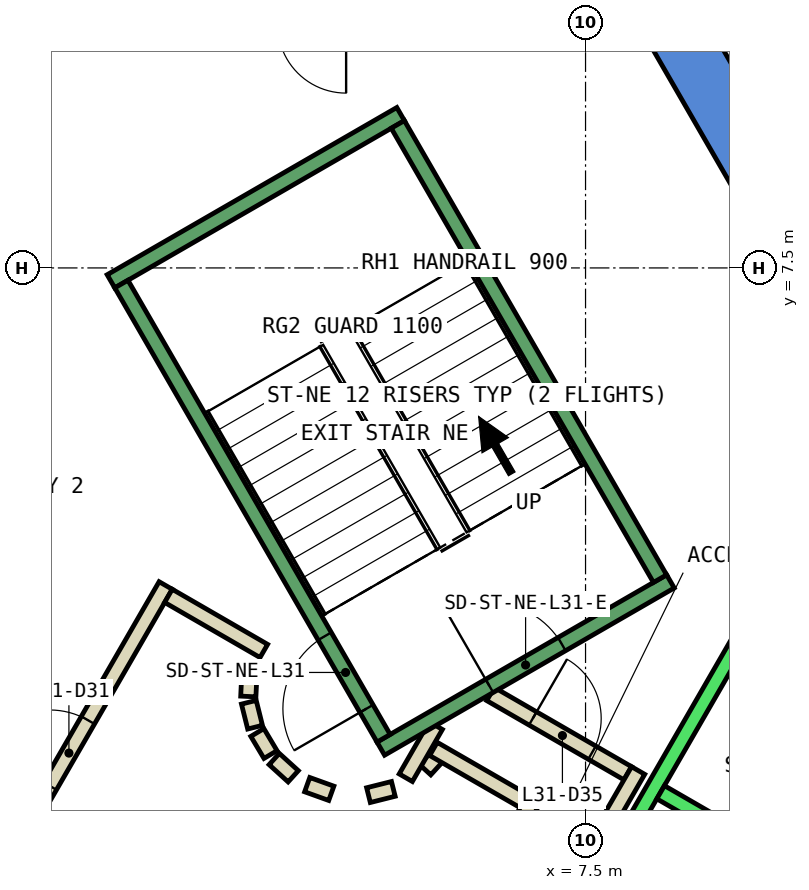
"""IFC4 building model, lengths in metres.
Left out: names, types, materials, properties, quantities, classifications, styles, units other than length and angle.
Written with IfcOpenShell. Run it as: python <this file> out.ifc"""

import sys

from ifc_helpers import new_model, si_unit, direction, frame, frame_2d, origin, place, context, subcontext, project, spatial, polyline, rectangle, outline, extrude, element, fill, save


model = new_model("IFC4")
c1 = context("Model", 3, precision=1e-05, world=origin(), true_north=direction((0.0, 1.0)))
c2 = subcontext(c1, "Body", "Model", "MODEL_VIEW")
j1 = project(units=[si_unit("LENGTHUNIT", "METRE"), si_unit("PLANEANGLEUNIT", "RADIAN")], contexts=[c1])
p1 = place(None, origin())
s1 = spatial("IfcSite", under=j1, at=p1, CompositionType="ELEMENT")
p2 = place(p1, origin())
s2 = spatial("IfcBuilding", under=s1, at=p2, CompositionType="ELEMENT")
p3 = place(p2, frame((0.0, 0.0, 142.4)))
s3 = spatial("IfcBuildingStorey", under=s2, at=p3, CompositionType="ELEMENT", Elevation=142.4)
p4 = place(p3, frame((0.0, 0.0, -0.4)))
e1 = element("IfcWall", 1, at=p4, inside=s3, PredefinedType="SHEAR", context=c2, shape_type="SweptSolid", body=[
    extrude(outline(polyline([(8.517, 11.748), (7.824, 11.348), (12.933, 2.5), (13.856, 2.5), (8.517, 11.748)])), origin(), (0.0, 0.0, 1.0), 4.2),
])
p5 = place(p3, frame((5.39, 0.898, 0.0), z_axis=(0.0, 0.0, 1.0), x_axis=(0.673828488714, 0.738887791073, 0.0)))
e2 = element("IfcWall", 2, at=p5, inside=s3, PredefinedType="PARTITIONING", context=c2, shape_type="SweptSolid", body=[
    extrude(rectangle(XDim=0.263, YDim=0.2, at=frame_2d((0.131, 0.0))), origin(), (0.0, 0.0, 1.0), 3.8),
])
p6 = place(p3, frame((5.499, 1.172, 0.0), z_axis=(0.0, 0.0, 1.0), x_axis=(0.866333505267, -0.499465972466, 0.0)))
e3 = element("IfcWall", 3, at=p6, inside=s3, PredefinedType="PARTITIONING", context=c2, shape_type="SweptSolid", body=[
    extrude(rectangle(XDim=1.374, YDim=0.2, at=frame_2d((0.687, 0.0))), origin(), (0.0, 0.0, 1.0), 3.8),
])
p7 = place(p3, frame((6.826, 0.522, 0.0), z_axis=(0.0, 0.0, 1.0), x_axis=(-0.500016722714, -0.866015748706, 0.0)))
e4 = element("IfcWall", 4, at=p7, inside=s3, PredefinedType="PARTITIONING", context=c2, shape_type="SweptSolid", body=[
    extrude(rectangle(XDim=1.7, YDim=0.2, at=frame_2d((0.85, 0.0))), origin(), (0.0, 0.0, 1.0), 3.8),
])
p8 = place(p3, frame((6.25, 1.894, 0.0), z_axis=(0.0, 0.0, 1.0), x_axis=(0.866043184279, -0.499969202016, 0.0)))
e5 = element("IfcWall", 5, at=p8, inside=s3, PredefinedType="PARTITIONING", context=c2, shape_type="SweptSolid", body=[
    extrude(rectangle(XDim=2.084, YDim=0.2, at=frame_2d((1.042, 0.0))), origin(), (0.0, 0.0, 1.0), 3.8),
])
p9 = place(p8, frame((0.642, 0.0, 0.0)))
e6 = element("IfcOpeningElement", 6, at=p9, cuts=e5, PredefinedType="OPENING", context=c2, shape_type="SweptSolid", body=[
    extrude(rectangle(XDim=0.9, YDim=2.1, at=frame_2d((0.45, 1.05))), frame((0.0, 0.11, 0.0), z_axis=(0.0, -1.0, 0.0), x_axis=(1.0, 0.0, 0.0)), (0.0, 0.0, 1.0), 0.22),
])
p10 = place(p3, frame((8.192, 0.888, 0.0), z_axis=(0.0, 0.0, 1.0), x_axis=(-0.499940625693, -0.866059680843, 0.0)))
e7 = element("IfcWall", 7, at=p10, inside=s3, PredefinedType="PARTITIONING", context=c2, shape_type="SweptSolid", body=[
    extrude(rectangle(XDim=2.68, YDim=0.2, at=frame_2d((1.34, 0.0))), origin(), (0.0, 0.0, 1.0), 3.8),
])
p11 = place(p3, frame((5.135, 0.793, 0.0), z_axis=(0.0, 0.0, 1.0), x_axis=(0.499526442893, 0.866298639529, 0.0)))
e8 = element("IfcWall", 8, at=p11, inside=s3, PredefinedType="PARTITIONING", context=c2, shape_type="SweptSolid", body=[
    extrude(rectangle(XDim=0.791, YDim=0.2, at=frame_2d((0.396, 0.0))), origin(), (0.0, 0.0, 1.0), 3.8),
])
p12 = place(p3, frame((-0.52, -1.0, 0.0), z_axis=(0.0, 0.0, 1.0), x_axis=(0.50011622646, 0.865958290007, 0.0)))
e9 = element("IfcWall", 9, at=p12, inside=s3, PredefinedType="PARTITIONING", context=c2, shape_type="SweptSolid", body=[
    extrude(rectangle(XDim=4.991, YDim=0.2, at=frame_2d((2.496, 0.0))), origin(), (0.0, 0.0, 1.0), 3.8),
])
p13 = place(p12, frame((1.945, 0.0, 0.0)))
e10 = element("IfcOpeningElement", 10, at=p13, cuts=e9, PredefinedType="OPENING", context=c2, shape_type="SweptSolid", body=[
    extrude(rectangle(XDim=1.0, YDim=2.1, at=frame_2d((0.5, 1.05))), frame((0.0, 0.11, 0.0), z_axis=(0.0, -1.0, 0.0), x_axis=(1.0, 0.0, 0.0)), (0.0, 0.0, 1.0), 0.22),
])
p14 = place(p3, frame((2.012, 3.186, 0.0), z_axis=(0.0, 0.0, 1.0), x_axis=(0.865891012941, -0.500232699559, 0.0)))
e11 = element("IfcWall", 11, at=p14, inside=s3, PredefinedType="PARTITIONING", context=c2, shape_type="SweptSolid", body=[
    extrude(rectangle(XDim=1.449, YDim=0.2, at=frame_2d((0.725, 0.0))), origin(), (0.0, 0.0, 1.0), 3.8),
])
p15 = place(p3, frame((3.079, 2.199, 0.0), z_axis=(0.0, 0.0, 1.0), x_axis=(-0.047771483479, -0.998858290933, 0.0)))
e12 = element("IfcWall", 12, at=p15, inside=s3, PredefinedType="PARTITIONING", context=c2, shape_type="SweptSolid", body=[
    extrude(rectangle(XDim=0.337, YDim=0.2, at=frame_2d((0.169, 0.0))), origin(), (0.0, 0.0, 1.0), 3.8),
])
p16 = place(p3, frame((3.07, 1.786, 0.0), z_axis=(0.0, 0.0, 1.0), x_axis=(0.242705583207, -0.970099994784, 0.0)))
e13 = element("IfcWall", 13, at=p16, inside=s3, PredefinedType="PARTITIONING", context=c2, shape_type="SweptSolid", body=[
    extrude(rectangle(XDim=0.338, YDim=0.2, at=frame_2d((0.169, 0.0))), origin(), (0.0, 0.0, 1.0), 3.8),
])
for number, where, z_axis, x_axis in (
    (14, (3.182, 1.388, 0.0), (0.0, 0.0, 1.0), (0.512, -0.859, 0.0)),
    (15, (3.404, 1.039, 0.0), (0.0, 0.0, 1.0), (0.74, -0.672, 0.0)),
):
    element("IfcWall", number, at=place(p3, frame(where, z_axis=z_axis, x_axis=x_axis)), inside=s3, PredefinedType="PARTITIONING", context=c2, shape_type="SweptSolid", body=[
        extrude(rectangle(XDim=0.338, YDim=0.2, at=frame_2d((0.169, 0.0))), origin(), (0.0, 0.0, 1.0), 3.8),
    ])
p17 = place(p3, frame((3.838, 0.702, 0.0), z_axis=(0.0, 0.0, 1.0), x_axis=(0.941035081519, -0.338308993895, 0.0)))
e16 = element("IfcWall", 16, at=p17, inside=s3, PredefinedType="PARTITIONING", context=c2, shape_type="SweptSolid", body=[
    extrude(rectangle(XDim=0.337, YDim=0.2, at=frame_2d((0.168, 0.0))), origin(), (0.0, 0.0, 1.0), 3.8),
])
p18 = place(p3, frame((4.644, 0.564, 0.0), z_axis=(0.0, 0.0, 1.0), x_axis=(0.969929076366, 0.243387729394, 0.0)))
e17 = element("IfcWall", 17, at=p18, inside=s3, PredefinedType="PARTITIONING", context=c2, shape_type="SweptSolid", body=[
    extrude(rectangle(XDim=0.337, YDim=0.2, at=frame_2d((0.168, 0.0))), origin(), (0.0, 0.0, 1.0), 3.8),
])
p19 = place(p3, frame((4.451, -6.19, 0.0), z_axis=(0.0, 0.0, 1.0), x_axis=(0.50000090737, 0.866024879913, 0.0)))
e18 = element("IfcWall", 18, at=p19, inside=s3, PredefinedType="STANDARD", context=c2, shape_type="SweptSolid", body=[
    extrude(rectangle(XDim=10.6, YDim=0.2, at=frame_2d((5.3, 0.0))), origin(), (0.0, 0.0, 1.0), 3.8),
])
p20 = place(p3, frame((8.488, 0.602, 0.0), z_axis=(0.0, 0.0, 1.0), x_axis=(0.866022959057, -0.500004234368, 0.0)))
e19 = element("IfcWall", 19, at=p20, inside=s3, PredefinedType="STANDARD", context=c2, shape_type="SweptSolid", body=[
    extrude(rectangle(XDim=2.5, YDim=0.2, at=frame_2d((1.25, 0.0))), origin(), (0.0, 0.0, 1.0), 3.8),
])
p21 = place(p3, frame((4.806, 1.176, 0.0), z_axis=(0.0, 0.0, 1.0), x_axis=(0.866059941101, 0.499940174841, 0.0)))
e20 = element("IfcWall", 20, at=p21, inside=s3, PredefinedType="STANDARD", context=c2, shape_type="SweptSolid", body=[
    extrude(rectangle(XDim=4.4, YDim=0.2, at=frame_2d((2.2, 0.0))), origin(), (0.0, 0.0, 1.0), 3.8),
])
p22 = place(p21, frame((1.65, 0.0, 0.0)))
e21 = element("IfcOpeningElement", 21, at=p22, cuts=e20, PredefinedType="OPENING", context=c2, shape_type="SweptSolid", body=[
    extrude(rectangle(XDim=1.1, YDim=2.2, at=frame_2d((0.55, 1.1))), frame((0.0, 0.11, 0.0), z_axis=(0.0, -1.0, 0.0), x_axis=(1.0, 0.0, 0.0)), (0.0, 0.0, 1.0), 0.22),
])
p23 = place(p3, frame((1.256, 7.324, 0.0), z_axis=(0.0, 0.0, 1.0), x_axis=(0.866046073146, 0.499964197906, 0.0)))
e22 = element("IfcWall", 22, at=p23, inside=s3, PredefinedType="STANDARD", context=c2, shape_type="SweptSolid", body=[
    extrude(rectangle(XDim=4.4, YDim=0.2, at=frame_2d((2.2, 0.0))), origin(), (0.0, 0.0, 1.0), 3.8),
])
p24 = place(p3, frame((4.843, 1.312, 0.0), z_axis=(0.0, 0.0, 1.0), x_axis=(-0.499963383562, 0.866046543262, 0.0)))
e23 = element("IfcWall", 23, at=p24, inside=s3, PredefinedType="STANDARD", context=c2, shape_type="SweptSolid", body=[
    extrude(rectangle(XDim=6.9, YDim=0.2, at=frame_2d((3.45, 0.0))), origin(), (0.0, 0.0, 1.0), 3.8),
])
p25 = place(p24, frame((0.45, 0.0, 0.0)))
e24 = element("IfcOpeningElement", 24, at=p25, cuts=e23, PredefinedType="OPENING", context=c2, shape_type="SweptSolid", body=[
    extrude(rectangle(XDim=1.1, YDim=2.2, at=frame_2d((0.55, 1.1))), frame((0.0, 0.11, 0.0), z_axis=(0.0, -1.0, 0.0), x_axis=(1.0, 0.0, 0.0)), (0.0, 0.0, 1.0), 0.22),
])
p26 = place(p3, frame((8.48, 3.412, 0.0), z_axis=(0.0, 0.0, 1.0), x_axis=(-0.499978703459, 0.866037698999, 0.0)))
e25 = element("IfcWall", 25, at=p26, inside=s3, PredefinedType="STANDARD", context=c2, shape_type="SweptSolid", body=[
    extrude(rectangle(XDim=6.9, YDim=0.2, at=frame_2d((3.45, 0.0))), origin(), (0.0, 0.0, 1.0), 3.8),
])
p27 = place(p13, origin())
e26 = element("IfcDoor", 26, at=p27, inside=s3, OperationType="SINGLE_SWING_LEFT", PredefinedType="DOOR", context=c2, shape_type="SweptSolid", body=[
    extrude(rectangle(XDim=1.0, YDim=2.1, at=frame_2d((0.5, 1.05))), frame((0.0, 0.025, 0.0), z_axis=(0.0, -1.0, 0.0), x_axis=(1.0, 0.0, 0.0)), (0.0, 0.0, 1.0), 0.05),
])
fill(e10, e26)
p28 = place(p9, origin())
e27 = element("IfcDoor", 27, at=p28, inside=s3, OperationType="SINGLE_SWING_LEFT", PredefinedType="DOOR", context=c2, shape_type="SweptSolid", body=[
    extrude(rectangle(XDim=0.9, YDim=2.1, at=frame_2d((0.45, 1.05))), frame((0.0, 0.025, 0.0), z_axis=(0.0, -1.0, 0.0), x_axis=(1.0, 0.0, 0.0)), (0.0, 0.0, 1.0), 0.05),
])
fill(e6, e27)
p29 = place(p25, origin())
e28 = element("IfcDoor", 28, at=p29, inside=s3, OperationType="SINGLE_SWING_LEFT", PredefinedType="DOOR", context=c2, shape_type="SweptSolid", body=[
    extrude(rectangle(XDim=1.1, YDim=2.2, at=frame_2d((0.55, 1.1))), frame((0.0, 0.025, 0.0), z_axis=(0.0, -1.0, 0.0), x_axis=(1.0, 0.0, 0.0)), (0.0, 0.0, 1.0), 0.05),
])
fill(e24, e28)
p30 = place(p22, origin())
e29 = element("IfcDoor", 29, at=p30, inside=s3, OperationType="SINGLE_SWING_LEFT", PredefinedType="DOOR", context=c2, shape_type="SweptSolid", body=[
    extrude(rectangle(XDim=1.1, YDim=2.2, at=frame_2d((0.55, 1.1))), frame((0.0, 0.025, 0.0), z_axis=(0.0, -1.0, 0.0), x_axis=(1.0, 0.0, 0.0)), (0.0, 0.0, 1.0), 0.05),
])
fill(e21, e29)
save(model, sys.argv[1])
